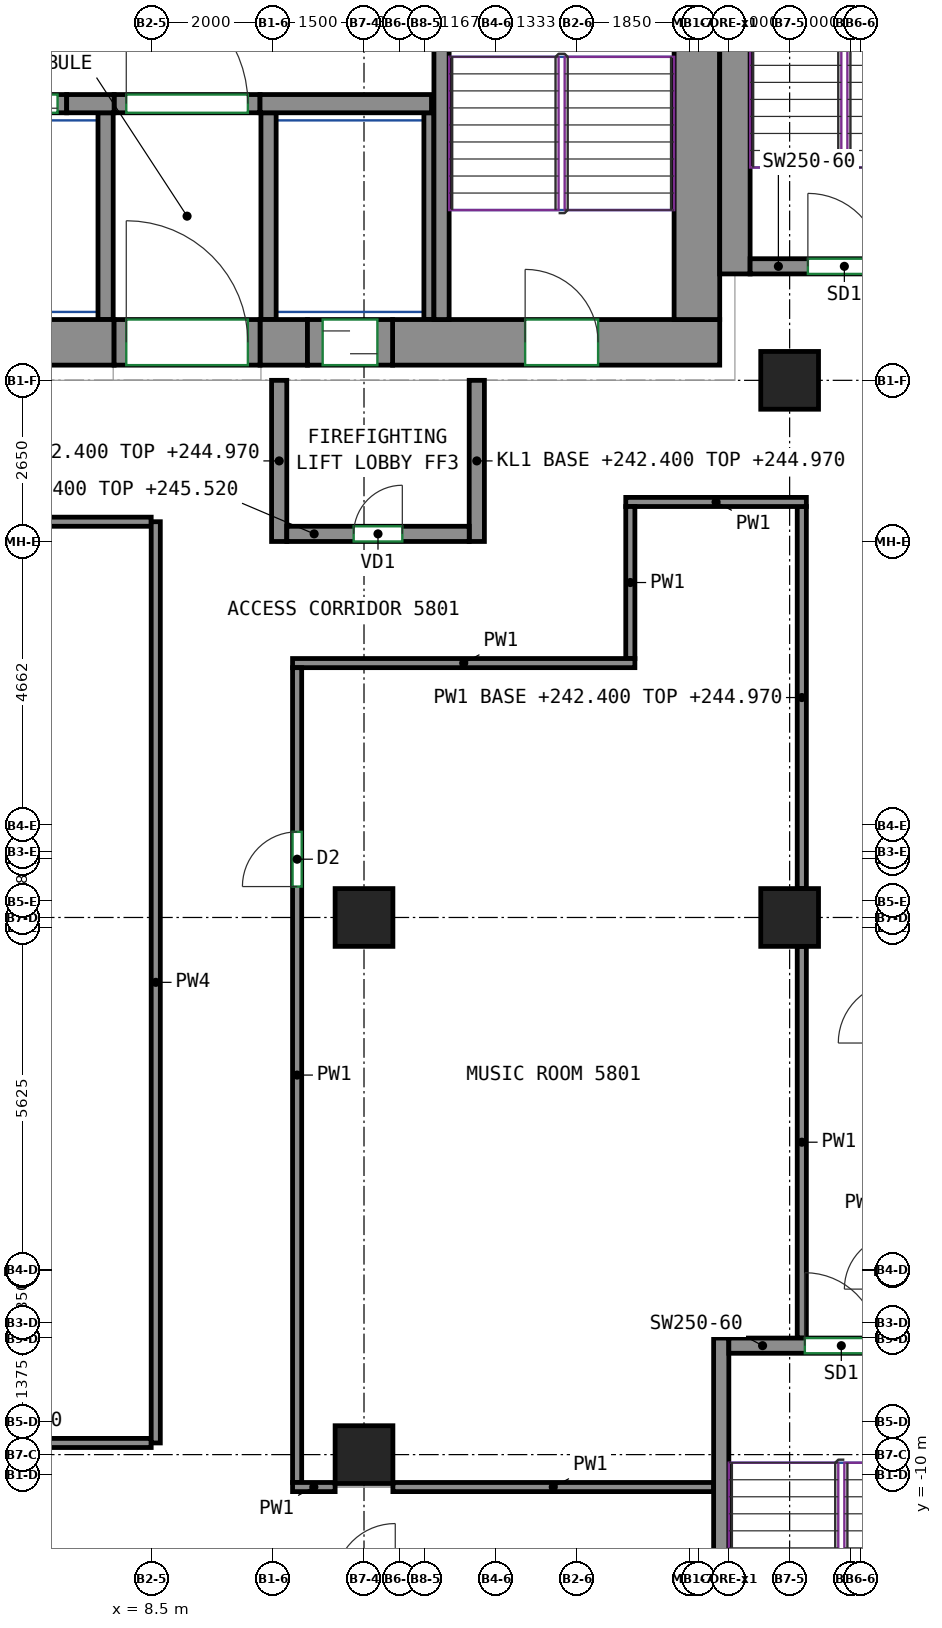
"""IFC4 building model, lengths in metres.
Left out: names, types, materials, properties, quantities, classifications, styles, units other than length and angle.
Written with IfcOpenShell. Run it as: python <this file> out.ifc"""

import sys

from ifc_helpers import new_model, si_unit, direction, frame, frame_2d, origin, origin_2d, place, context, subcontext, project, spatial, rectangle, extrude, source, transform, mapped, element, fill, save


model = new_model("IFC4")
c1 = context("Model", 3, precision=1e-05, world=origin(), true_north=direction((0.0, 1.0)))
c2 = subcontext(c1, "Body", "Model", "MODEL_VIEW")
j1 = project(units=[si_unit("LENGTHUNIT", "METRE"), si_unit("PLANEANGLEUNIT", "RADIAN")], contexts=[c1])
p1 = place(None, origin())
s1 = spatial("IfcSite", under=j1, at=p1, CompositionType="ELEMENT")
p2 = place(p1, origin())
s2 = spatial("IfcBuilding", under=s1, at=p2, CompositionType="ELEMENT")
p3 = place(p2, frame((0.0, 0.0, 242.4)))
s3 = spatial("IfcBuildingStorey", under=s2, at=p3, CompositionType="ELEMENT", Elevation=242.4)
m1 = source(origin(), c2, "Body", "SweptSolid", [
    extrude(rectangle(XDim=0.95, YDim=0.95, at=origin_2d()), origin(), (0.0, 0.0, 1.0), 3.12),
])
for number, where, z_axis, x_axis in (
    (1, (12.0, -9.667, 0.0), (0.0, 0.0, 1.0), (1.0, 0.0, 0.0)),
    (2, (12.0, -0.833, 0.0), (0.0, 0.0, 1.0), (1.0, 0.0, 0.0)),
    (3, (19.0, -0.833, 0.0), (0.0, 0.0, 1.0), (1.0, 0.0, 0.0)),
    (4, (19.0, 8.0, 0.0), (0.0, 0.0, 1.0), (1.0, 0.0, 0.0)),
):
    element("IfcColumn", number, at=place(p3, frame(where, z_axis=z_axis, x_axis=x_axis)), inside=s3, PredefinedType="COLUMN", context=c2, shape_type="MappedRepresentation", body=[
        mapped(m1, transform((0.0, 0.0, 0.0))),
    ])
m2 = source(origin(), c2, "Body", "SweptSolid", [
    extrude(rectangle(XDim=14.18, YDim=0.75, at=frame_2d((7.09, 0.0))), origin(), (0.0, 0.0, 1.0), 3.12),
])
p4 = place(p3, frame((-6.29, 8.625, 0.0), z_axis=(0.0, 0.0, 1.0), x_axis=(1.0, 0.0, 0.0)))
e5 = element("IfcWall", 5, at=p4, inside=s3, PredefinedType="SHEAR", context=c2, shape_type="MappedRepresentation", body=[
    mapped(m2, transform((0.0, 0.0, 0.0))),
])
m3 = source(origin(), c2, "Body", "SweptSolid", [
    extrude(rectangle(XDim=0.78, YDim=0.75, at=frame_2d((0.39, 0.0))), origin(), (0.0, 0.0, 1.0), 3.12),
])
p5 = place(p3, frame((10.29, 8.625, 0.0), z_axis=(0.0, 0.0, 1.0), x_axis=(1.0, 0.0, 0.0)))
e6 = element("IfcWall", 6, at=p5, inside=s3, PredefinedType="SHEAR", context=c2, shape_type="MappedRepresentation", body=[
    mapped(m3, transform((0.0, 0.0, 0.0))),
])
m4 = source(origin(), c2, "Body", "SweptSolid", [
    extrude(rectangle(XDim=5.38, YDim=0.75, at=frame_2d((2.69, 0.0))), origin(), (0.0, 0.0, 1.0), 3.12),
])
p6 = place(p3, frame((12.47, 8.625, 0.0), z_axis=(0.0, 0.0, 1.0), x_axis=(1.0, 0.0, 0.0)))
e7 = element("IfcWall", 7, at=p6, inside=s3, PredefinedType="SHEAR", context=c2, shape_type="MappedRepresentation", body=[
    mapped(m4, transform((0.0, 0.0, 0.0))),
])
p7 = place(p6, frame((2.18, 0.0, 0.0)))
e8 = element("IfcOpeningElement", 8, at=p7, cuts=e7, PredefinedType="OPENING", context=c2, shape_type="SweptSolid", body=[
    extrude(rectangle(XDim=1.2, YDim=2.1, at=frame_2d((0.6, 1.05))), frame((0.0, 0.385, 0.0), z_axis=(0.0, -1.0, 0.0), x_axis=(1.0, 0.0, 0.0)), (0.0, 0.0, 1.0), 0.77),
])
m5 = source(origin(), c2, "Body", "SweptSolid", [
    extrude(rectangle(XDim=12.0, YDim=0.75, at=frame_2d((6.0, 0.0))), origin(), (0.0, 0.0, 1.0), 3.12),
])
p8 = place(p3, frame((17.475, 9.0, 0.0), z_axis=(0.0, 0.0, 1.0), x_axis=(0.0, 1.0, 0.0)))
e9 = element("IfcWall", 9, at=p8, inside=s3, PredefinedType="SHEAR", context=c2, shape_type="MappedRepresentation", body=[
    mapped(m5, transform((0.0, 0.0, 0.0))),
])
m6 = source(origin(), c2, "Body", "SweptSolid", [
    extrude(rectangle(XDim=7.75, YDim=0.25, at=frame_2d((3.875, 0.0))), origin(), (0.0, 0.0, 1.0), 3.12),
])
p9 = place(p3, frame((13.275, 9.0, 0.0), z_axis=(0.0, 0.0, 1.0), x_axis=(0.0, 1.0, 0.0)))
e10 = element("IfcWall", 10, at=p9, inside=s3, PredefinedType="SHEAR", context=c2, shape_type="MappedRepresentation", body=[
    mapped(m6, transform((0.0, 0.0, 0.0))),
])
m7 = source(origin(), c2, "Body", "SweptSolid", [
    extrude(rectangle(XDim=8.0, YDim=0.25, at=frame_2d((4.0, 0.0))), origin(), (0.0, 0.0, 1.0), 3.12),
])
p10 = place(p3, frame((17.875, -15.75, 0.0), z_axis=(0.0, 0.0, 1.0), x_axis=(0.0, 1.0, 0.0)))
e11 = element("IfcWall", 11, at=p10, inside=s3, PredefinedType="SHEAR", context=c2, shape_type="MappedRepresentation", body=[
    mapped(m7, transform((0.0, 0.0, 0.0))),
])
m8 = source(origin(), c2, "Body", "SweptSolid", [
    extrude(rectangle(XDim=3.7, YDim=0.25, at=frame_2d((1.85, 0.0))), origin(), (0.0, 0.0, 1.0), 3.12),
])
p11 = place(p3, frame((18.0, -7.875, 0.0), z_axis=(0.0, 0.0, 1.0), x_axis=(1.0, 0.0, 0.0)))
e12 = element("IfcWall", 12, at=p11, inside=s3, PredefinedType="SHEAR", context=c2, shape_type="MappedRepresentation", body=[
    mapped(m8, transform((0.0, 0.0, 0.0))),
])
p12 = place(p11, frame((1.25, 0.0, 0.0)))
e13 = element("IfcOpeningElement", 13, at=p12, cuts=e12, PredefinedType="OPENING", context=c2, shape_type="SweptSolid", body=[
    extrude(rectangle(XDim=1.2, YDim=2.1, at=frame_2d((0.6, 1.05))), frame((0.0, 0.135, 0.0), z_axis=(0.0, -1.0, 0.0), x_axis=(1.0, 0.0, 0.0)), (0.0, 0.0, 1.0), 0.27),
])
m9 = source(origin(), c2, "Body", "SweptSolid", [
    extrude(rectangle(XDim=8.0, YDim=0.5, at=frame_2d((4.0, 0.0))), origin(), (0.0, 0.0, 1.0), 3.12),
])
p13 = place(p3, frame((18.1, 9.75, 0.0), z_axis=(0.0, 0.0, 1.0), x_axis=(0.0, 1.0, 0.0)))
e14 = element("IfcWall", 14, at=p13, inside=s3, PredefinedType="SHEAR", context=c2, shape_type="MappedRepresentation", body=[
    mapped(m9, transform((0.0, 0.0, 0.0))),
])
m10 = source(origin(), c2, "Body", "SweptSolid", [
    extrude(rectangle(XDim=3.1, YDim=0.25, at=frame_2d((1.55, 0.0))), origin(), (0.0, 0.0, 1.0), 3.12),
])
p14 = place(p3, frame((18.35, 9.875, 0.0), z_axis=(0.0, 0.0, 1.0), x_axis=(1.0, 0.0, 0.0)))
e15 = element("IfcWall", 15, at=p14, inside=s3, PredefinedType="SHEAR", context=c2, shape_type="MappedRepresentation", body=[
    mapped(m10, transform((0.0, 0.0, 0.0))),
])
p15 = place(p14, frame((0.95, 0.0, 0.0)))
e16 = element("IfcOpeningElement", 16, at=p15, cuts=e15, PredefinedType="OPENING", context=c2, shape_type="SweptSolid", body=[
    extrude(rectangle(XDim=1.2, YDim=2.1, at=frame_2d((0.6, 1.05))), frame((0.0, 0.135, 0.0), z_axis=(0.0, -1.0, 0.0), x_axis=(1.0, 0.0, 0.0)), (0.0, 0.0, 1.0), 0.27),
])
m11 = source(origin(), c2, "Body", "SweptSolid", [
    extrude(rectangle(XDim=0.78, YDim=0.3, at=frame_2d((0.39, 0.0))), origin(), (0.0, 0.0, 1.0), 3.12),
])
p16 = place(p3, frame((7.11, 12.55, 0.0), z_axis=(0.0, 0.0, 1.0), x_axis=(1.0, 0.0, 0.0)))
e17 = element("IfcWall", 17, at=p16, inside=s3, PredefinedType="SHEAR", context=c2, shape_type="MappedRepresentation", body=[
    mapped(m11, transform((0.0, 0.0, 0.0))),
])
m12 = source(origin(), c2, "Body", "SweptSolid", [
    extrude(rectangle(XDim=2.82, YDim=0.3, at=frame_2d((1.41, 0.0))), origin(), (0.0, 0.0, 1.0), 3.12),
])
p17 = place(p3, frame((10.29, 12.55, 0.0), z_axis=(0.0, 0.0, 1.0), x_axis=(1.0, 0.0, 0.0)))
e18 = element("IfcWall", 18, at=p17, inside=s3, PredefinedType="SHEAR", context=c2, shape_type="MappedRepresentation", body=[
    mapped(m12, transform((0.0, 0.0, 0.0))),
])
m13 = source(origin(), c2, "Body", "SweptSolid", [
    extrude(rectangle(XDim=1.4, YDim=0.3, at=frame_2d((0.7, 0.0))), origin(), (0.0, 0.0, 1.0), 3.12),
])
p18 = place(p3, frame((5.71, 12.55, 0.0), z_axis=(0.0, 0.0, 1.0), x_axis=(1.0, 0.0, 0.0)))
e19 = element("IfcWall", 19, at=p18, inside=s3, PredefinedType="PARTITIONING", context=c2, shape_type="MappedRepresentation", body=[
    mapped(m13, transform((0.0, 0.0, 0.0))),
])
p19 = place(p18, frame((0.15, 0.0, 0.0)))
e20 = element("IfcOpeningElement", 20, at=p19, cuts=e19, PredefinedType="OPENING", context=c2, shape_type="SweptSolid", body=[
    extrude(rectangle(XDim=1.1, YDim=2.1, at=frame_2d((0.55, 1.05))), frame((0.0, 0.16, 0.0), z_axis=(0.0, -1.0, 0.0), x_axis=(1.0, 0.0, 0.0)), (0.0, 0.0, 1.0), 0.32),
])
m14 = source(origin(), c2, "Body", "SweptSolid", [
    extrude(rectangle(XDim=2.4, YDim=0.3, at=frame_2d((1.2, 0.0))), origin(), (0.0, 0.0, 1.0), 3.12),
])
p20 = place(p3, frame((7.89, 12.55, 0.0), z_axis=(0.0, 0.0, 1.0), x_axis=(1.0, 0.0, 0.0)))
e21 = element("IfcWall", 21, at=p20, inside=s3, PredefinedType="PARTITIONING", context=c2, shape_type="MappedRepresentation", body=[
    mapped(m14, transform((0.0, 0.0, 0.0))),
])
p21 = place(p20, frame((0.2, 0.0, 0.0)))
e22 = element("IfcOpeningElement", 22, at=p21, cuts=e21, PredefinedType="OPENING", context=c2, shape_type="SweptSolid", body=[
    extrude(rectangle(XDim=2.0, YDim=2.1, at=frame_2d((1.0, 1.05))), frame((0.0, 0.16, 0.0), z_axis=(0.0, -1.0, 0.0), x_axis=(1.0, 0.0, 0.0)), (0.0, 0.0, 1.0), 0.32),
])
m15 = source(origin(), c2, "Body", "SweptSolid", [
    extrude(rectangle(XDim=2.65, YDim=0.25, at=frame_2d((1.325, 0.0))), origin(), (0.0, 0.0, 1.0), 2.57),
])
for number, where, z_axis, x_axis in (
    (23, (10.605, 5.35, 0.0), (0.0, 0.0, 1.0), (0.0, 1.0, 0.0)),
    (24, (13.855, 5.35, 0.0), (0.0, 0.0, 1.0), (0.0, 1.0, 0.0)),
):
    element("IfcWall", number, at=place(p3, frame(where, z_axis=z_axis, x_axis=x_axis)), inside=s3, PredefinedType="PARTITIONING", context=c2, shape_type="MappedRepresentation", body=[
        mapped(m15, transform((0.0, 0.0, 0.0))),
    ])
m16 = source(origin(), c2, "Body", "SweptSolid", [
    extrude(rectangle(XDim=3.0, YDim=0.25, at=frame_2d((1.5, 0.0))), origin(), (0.0, 0.0, 1.0), 3.12),
])
p22 = place(p3, frame((10.73, 5.475, 0.0), z_axis=(0.0, 0.0, 1.0), x_axis=(1.0, 0.0, 0.0)))
e25 = element("IfcWall", 25, at=p22, inside=s3, PredefinedType="PARTITIONING", context=c2, shape_type="MappedRepresentation", body=[
    mapped(m16, transform((0.0, 0.0, 0.0))),
])
p23 = place(p22, frame((1.1, 0.0, 0.0)))
e26 = element("IfcOpeningElement", 26, at=p23, cuts=e25, PredefinedType="OPENING", context=c2, shape_type="SweptSolid", body=[
    extrude(rectangle(XDim=0.8, YDim=2.0, at=frame_2d((0.4, 1.0))), frame((0.0, 0.135, 0.0), z_axis=(0.0, -1.0, 0.0), x_axis=(1.0, 0.0, 0.0)), (0.0, 0.0, 1.0), 0.27),
])
m17 = source(origin(), c2, "Body", "SweptSolid", [
    extrude(rectangle(XDim=3.4, YDim=0.25, at=frame_2d((1.7, 0.0))), origin(), (0.0, 0.0, 1.0), 3.12),
])
p24 = place(p3, frame((10.43, 9.0, 0.0), z_axis=(0.0, 0.0, 1.0), x_axis=(0.0, 1.0, 0.0)))
e27 = element("IfcWall", 27, at=p24, inside=s3, PredefinedType="PARTITIONING", context=c2, shape_type="MappedRepresentation", body=[
    mapped(m17, transform((0.0, 0.0, 0.0))),
])
m18 = source(origin(), c2, "Body", "SweptSolid", [
    extrude(rectangle(XDim=3.4, YDim=0.165, at=frame_2d((1.7, 0.0))), origin(), (0.0, 0.0, 1.0), 3.12),
])
p25 = place(p3, frame((13.067, 9.0, 0.0), z_axis=(0.0, 0.0, 1.0), x_axis=(0.0, 1.0, 0.0)))
e28 = element("IfcWall", 28, at=p25, inside=s3, PredefinedType="PARTITIONING", context=c2, shape_type="MappedRepresentation", body=[
    mapped(m18, transform((0.0, 0.0, 0.0))),
])
p26 = place(p3, frame((7.75, 9.0, 0.0), z_axis=(0.0, 0.0, 1.0), x_axis=(0.0, 1.0, 0.0)))
e29 = element("IfcWall", 29, at=p26, inside=s3, PredefinedType="PARTITIONING", context=c2, shape_type="MappedRepresentation", body=[
    mapped(m17, transform((0.0, 0.0, 0.0))),
])
m19 = source(origin(), c2, "Body", "SweptSolid", [
    extrude(rectangle(XDim=2.4, YDim=0.75, at=frame_2d((1.2, 0.0))), origin(), (0.0, 0.0, 1.0), 2.7),
])
p27 = place(p3, frame((7.89, 8.625, 0.0), z_axis=(0.0, 0.0, 1.0), x_axis=(1.0, 0.0, 0.0)))
e30 = element("IfcWall", 30, at=p27, inside=s3, PredefinedType="PARTITIONING", context=c2, shape_type="MappedRepresentation", body=[
    mapped(m19, transform((0.0, 0.0, 0.0))),
])
p28 = place(p27, frame((0.2, 0.0, 0.0)))
e31 = element("IfcOpeningElement", 31, at=p28, cuts=e30, PredefinedType="OPENING", context=c2, shape_type="SweptSolid", body=[
    extrude(rectangle(XDim=2.0, YDim=2.1, at=frame_2d((1.0, 1.05))), frame((0.0, 0.385, 0.0), z_axis=(0.0, -1.0, 0.0), x_axis=(1.0, 0.0, 0.0)), (0.0, 0.0, 1.0), 0.77),
])
m20 = source(origin(), c2, "Body", "SweptSolid", [
    extrude(rectangle(XDim=1.4, YDim=0.75, at=frame_2d((0.7, 0.0))), origin(), (0.0, 0.0, 1.0), 2.7),
])
p29 = place(p3, frame((11.07, 8.625, 0.0), z_axis=(0.0, 0.0, 1.0), x_axis=(1.0, 0.0, 0.0)))
e32 = element("IfcWall", 32, at=p29, inside=s3, PredefinedType="PARTITIONING", context=c2, shape_type="MappedRepresentation", body=[
    mapped(m20, transform((0.0, 0.0, 0.0))),
])
p30 = place(p29, frame((0.25, 0.0, 0.0)))
e33 = element("IfcOpeningElement", 33, at=p30, cuts=e32, PredefinedType="OPENING", context=c2, shape_type="SweptSolid", body=[
    extrude(rectangle(XDim=0.9, YDim=2.1, at=frame_2d((0.45, 1.05))), frame((0.0, 0.385, 0.0), z_axis=(0.0, -1.0, 0.0), x_axis=(1.0, 0.0, 0.0)), (0.0, 0.0, 1.0), 0.77),
])
p31 = place(p3, frame((19.2, -7.75, 0.0), z_axis=(0.0, 0.0, 1.0), x_axis=(0.0, 1.0, 0.0)))
e34 = element("IfcWall", 34, at=p31, inside=s3, PredefinedType="PARTITIONING", context=c2, shape_type="SweptSolid", body=[
    extrude(rectangle(XDim=6.442, YDim=0.15, at=frame_2d((3.221, 0.0))), origin(), (0.0, 0.0, 1.0), 3.12),
])
p32 = place(p3, frame((19.2, -0.358, 0.0), z_axis=(0.0, 0.0, 1.0), x_axis=(0.0, 1.0, 0.0)))
e35 = element("IfcWall", 35, at=p32, inside=s3, PredefinedType="PARTITIONING", context=c2, shape_type="SweptSolid", body=[
    extrude(rectangle(XDim=6.283, YDim=0.15, at=frame_2d((3.142, 0.0))), origin(), (0.0, 0.0, 1.0), 2.57),
])
p33 = place(p3, frame((16.305, 6.0, 0.0), z_axis=(0.0, 0.0, 1.0), x_axis=(1.0, 0.0, 0.0)))
e36 = element("IfcWall", 36, at=p33, inside=s3, PredefinedType="PARTITIONING", context=c2, shape_type="SweptSolid", body=[
    extrude(rectangle(XDim=2.97, YDim=0.15, at=frame_2d((1.485, 0.0))), origin(), (0.0, 0.0, 1.0), 3.12),
])
p34 = place(p3, frame((16.38, 3.425, 0.0), z_axis=(0.0, 0.0, 1.0), x_axis=(0.0, 1.0, 0.0)))
e37 = element("IfcWall", 37, at=p34, inside=s3, PredefinedType="PARTITIONING", context=c2, shape_type="SweptSolid", body=[
    extrude(rectangle(XDim=2.5, YDim=0.15, at=frame_2d((1.25, 0.0))), origin(), (0.0, 0.0, 1.0), 3.12),
])
p35 = place(p3, frame((10.825, 3.35, 0.0), z_axis=(0.0, 0.0, 1.0), x_axis=(1.0, 0.0, 0.0)))
e38 = element("IfcWall", 38, at=p35, inside=s3, PredefinedType="PARTITIONING", context=c2, shape_type="SweptSolid", body=[
    extrude(rectangle(XDim=5.63, YDim=0.15, at=frame_2d((2.815, 0.0))), origin(), (0.0, 0.0, 1.0), 3.12),
])
p36 = place(p3, frame((10.9, -10.125, 0.0), z_axis=(0.0, 0.0, 1.0), x_axis=(0.0, 1.0, 0.0)))
e39 = element("IfcWall", 39, at=p36, inside=s3, PredefinedType="PARTITIONING", context=c2, shape_type="SweptSolid", body=[
    extrude(rectangle(XDim=13.4, YDim=0.15, at=frame_2d((6.7, 0.0))), origin(), (0.0, 0.0, 1.0), 3.12),
])
p37 = place(p36, frame((9.8, 0.0, 0.0)))
e40 = element("IfcOpeningElement", 40, at=p37, cuts=e39, PredefinedType="OPENING", context=c2, shape_type="SweptSolid", body=[
    extrude(rectangle(XDim=0.9, YDim=2.1, at=frame_2d((0.45, 1.05))), frame((0.0, 0.085, 0.0), z_axis=(0.0, -1.0, 0.0), x_axis=(1.0, 0.0, 0.0)), (0.0, 0.0, 1.0), 0.17),
])
p38 = place(p3, frame((12.475, -10.2, 0.0), z_axis=(0.0, 0.0, 1.0), x_axis=(1.0, 0.0, 0.0)))
e41 = element("IfcWall", 41, at=p38, inside=s3, PredefinedType="PARTITIONING", context=c2, shape_type="SweptSolid", body=[
    extrude(rectangle(XDim=5.275, YDim=0.15, at=frame_2d((2.637, 0.0))), origin(), (0.0, 0.0, 1.0), 3.12),
])
p39 = place(p3, frame((10.825, -10.2, 0.0), z_axis=(0.0, 0.0, 1.0), x_axis=(1.0, 0.0, 0.0)))
e42 = element("IfcWall", 42, at=p39, inside=s3, PredefinedType="PARTITIONING", context=c2, shape_type="SweptSolid", body=[
    extrude(rectangle(XDim=0.7, YDim=0.15, at=frame_2d((0.35, 0.0))), origin(), (0.0, 0.0, 1.0), 3.12),
])
p40 = place(p3, frame((8.5, -9.475, 0.0), z_axis=(0.0, 0.0, 1.0), x_axis=(-1.0, 0.0, 0.0)))
e43 = element("IfcWall", 43, at=p40, inside=s3, PredefinedType="PARTITIONING", context=c2, shape_type="SweptSolid", body=[
    extrude(rectangle(XDim=15.075, YDim=0.15, at=frame_2d((7.538, 0.0))), origin(), (0.0, 0.0, 1.0), 2.57),
])
p41 = place(p3, frame((-6.575, 5.675, 0.0), z_axis=(0.0, 0.0, 1.0), x_axis=(1.0, 0.0, 0.0)))
e44 = element("IfcWall", 44, at=p41, inside=s3, PredefinedType="PARTITIONING", context=c2, shape_type="SweptSolid", body=[
    extrude(rectangle(XDim=15.075, YDim=0.15, at=frame_2d((7.538, 0.0))), origin(), (0.0, 0.0, 1.0), 3.12),
])
p42 = place(p3, frame((8.575, 5.675, 0.0), z_axis=(0.0, 0.0, 1.0), x_axis=(0.0, -1.0, 0.0)))
e45 = element("IfcWall", 45, at=p42, inside=s3, PredefinedType="PARTITIONING", context=c2, shape_type="SweptSolid", body=[
    extrude(rectangle(XDim=15.15, YDim=0.15, at=frame_2d((7.575, 0.0))), origin(), (0.0, 0.0, 1.0), 3.12),
])
p43 = place(p21, origin())
e46 = element("IfcDoor", 46, at=p43, inside=s3, OperationType="DOUBLE_DOOR_SINGLE_SWING", PredefinedType="DOOR", context=c2, shape_type="SweptSolid", body=[
    extrude(rectangle(XDim=2.0, YDim=2.1, at=frame_2d((1.0, 1.05))), frame((0.0, 0.025, 0.0), z_axis=(0.0, -1.0, 0.0), x_axis=(1.0, 0.0, 0.0)), (0.0, 0.0, 1.0), 0.05),
])
fill(e22, e46)
p44 = place(p28, origin())
e47 = element("IfcDoor", 47, at=p44, inside=s3, OperationType="DOUBLE_DOOR_SINGLE_SWING", PredefinedType="DOOR", context=c2, shape_type="SweptSolid", body=[
    extrude(rectangle(XDim=2.0, YDim=2.1, at=frame_2d((1.0, 1.05))), frame((0.0, 0.28, 0.0), z_axis=(0.0, -1.0, 0.0), x_axis=(1.0, 0.0, 0.0)), (0.0, 0.0, 1.0), 0.05),
])
fill(e31, e47)
p45 = place(p23, origin())
e48 = element("IfcDoor", 48, at=p45, inside=s3, OperationType="SINGLE_SWING_RIGHT", PredefinedType="DOOR", context=c2, shape_type="SweptSolid", body=[
    extrude(rectangle(XDim=0.8, YDim=2.0, at=frame_2d((0.4, 1.0))), frame((0.0, 0.025, 0.0), z_axis=(0.0, -1.0, 0.0), x_axis=(1.0, 0.0, 0.0)), (0.0, 0.0, 1.0), 0.05),
])
fill(e26, e48)
p46 = place(p30, origin())
e49 = element("IfcDoor", 49, at=p46, inside=s3, OperationType="SLIDING_TO_LEFT", PredefinedType="DOOR", context=c2, shape_type="SweptSolid", body=[
    extrude(rectangle(XDim=0.9, YDim=2.1, at=frame_2d((0.45, 1.05))), frame((0.0, 0.28, 0.0), z_axis=(0.0, -1.0, 0.0), x_axis=(1.0, 0.0, 0.0)), (0.0, 0.0, 1.0), 0.05),
])
fill(e33, e49)
p47 = place(p19, origin())
e50 = element("IfcDoor", 50, at=p47, inside=s3, OperationType="DOUBLE_DOOR_SLIDING", PredefinedType="DOOR", context=c2, shape_type="SweptSolid", body=[
    extrude(rectangle(XDim=1.1, YDim=2.1, at=frame_2d((0.55, 1.05))), frame((0.0, 0.025, 0.0), z_axis=(0.0, -1.0, 0.0), x_axis=(1.0, 0.0, 0.0)), (0.0, 0.0, 1.0), 0.05),
])
fill(e20, e50)
p48 = place(p7, origin())
e51 = element("IfcDoor", 51, at=p48, inside=s3, OperationType="DOUBLE_DOOR_SINGLE_SWING", PredefinedType="DOOR", context=c2, shape_type="SweptSolid", body=[
    extrude(rectangle(XDim=1.2, YDim=2.1, at=frame_2d((0.6, 1.05))), frame((0.0, 0.28, 0.0), z_axis=(0.0, -1.0, 0.0), x_axis=(1.0, 0.0, 0.0)), (0.0, 0.0, 1.0), 0.05),
])
fill(e8, e51)
p49 = place(p12, origin())
e52 = element("IfcDoor", 52, at=p49, inside=s3, OperationType="DOUBLE_DOOR_SINGLE_SWING", PredefinedType="DOOR", context=c2, shape_type="SweptSolid", body=[
    extrude(rectangle(XDim=1.2, YDim=2.1, at=frame_2d((0.6, 1.05))), frame((0.0, 0.025, 0.0), z_axis=(0.0, -1.0, 0.0), x_axis=(1.0, 0.0, 0.0)), (0.0, 0.0, 1.0), 0.05),
])
fill(e13, e52)
p50 = place(p15, origin())
e53 = element("IfcDoor", 53, at=p50, inside=s3, OperationType="DOUBLE_DOOR_SINGLE_SWING", PredefinedType="DOOR", context=c2, shape_type="SweptSolid", body=[
    extrude(rectangle(XDim=1.2, YDim=2.1, at=frame_2d((0.6, 1.05))), frame((0.0, 0.025, 0.0), z_axis=(0.0, -1.0, 0.0), x_axis=(1.0, 0.0, 0.0)), (0.0, 0.0, 1.0), 0.05),
])
fill(e16, e53)
p51 = place(p37, origin())
e54 = element("IfcDoor", 54, at=p51, inside=s3, OperationType="SINGLE_SWING_LEFT", PredefinedType="DOOR", context=c2, shape_type="SweptSolid", body=[
    extrude(rectangle(XDim=0.9, YDim=2.1, at=frame_2d((0.45, 1.05))), frame((0.0, 0.025, 0.0), z_axis=(0.0, -1.0, 0.0), x_axis=(1.0, 0.0, 0.0)), (0.0, 0.0, 1.0), 0.05),
])
fill(e40, e54)
save(model, sys.argv[1])
